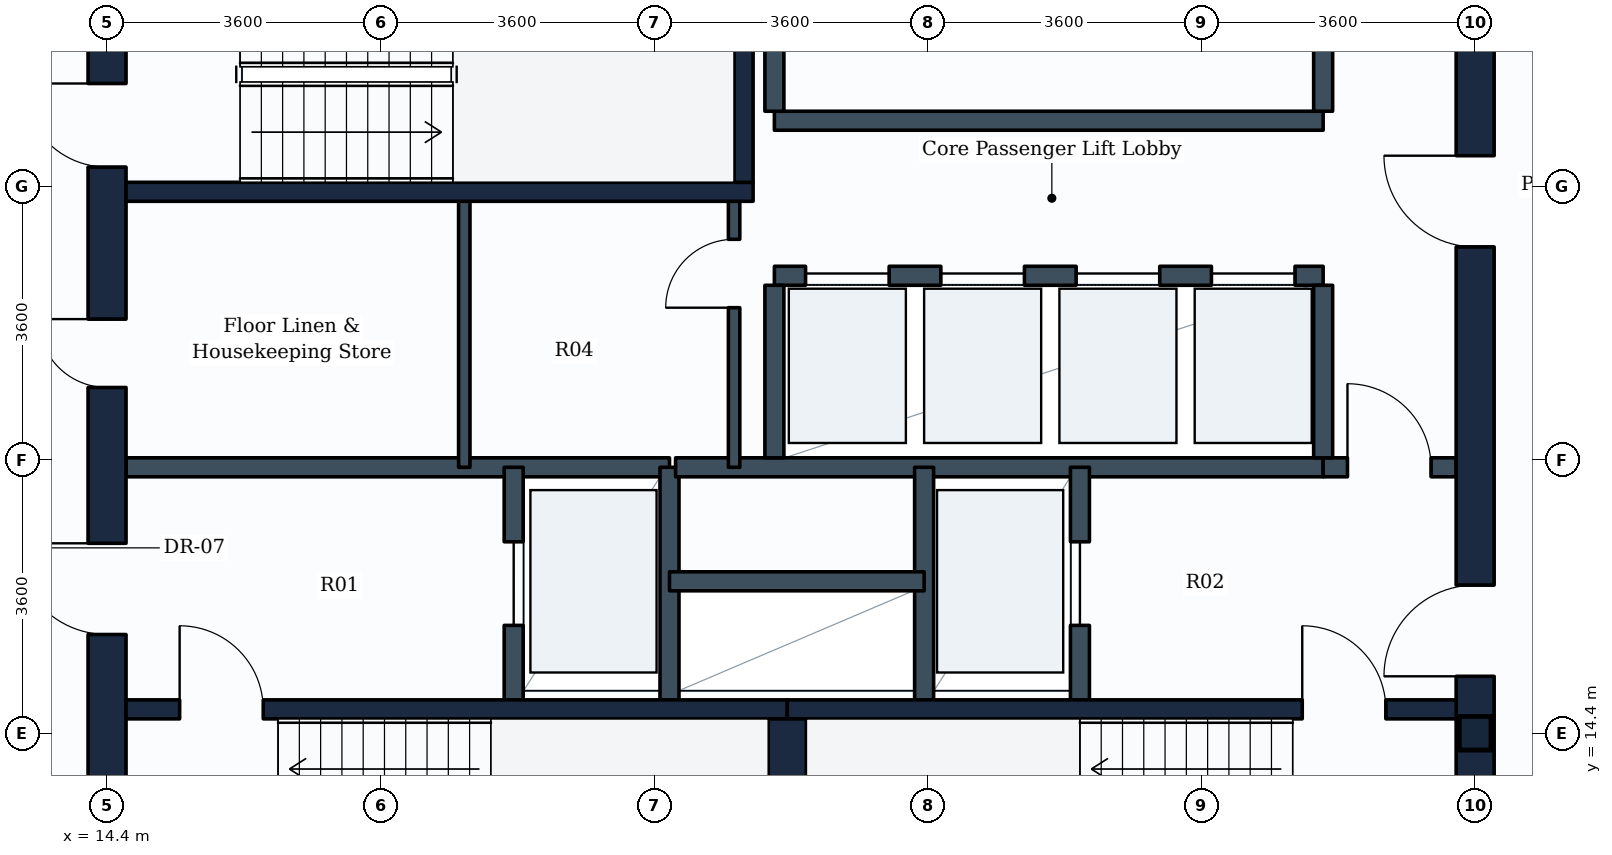
"""IFC4 building model, lengths in metres.
Left out: names, types, materials, properties, quantities, classifications, styles, units other than length and angle.
Written with IfcOpenShell. Run it as: python <this file> out.ifc"""

import sys

from ifc_helpers import new_model, si_unit, direction, frame, frame_2d, origin, origin_2d, place, context, subcontext, project, spatial, rectangle, i_section, extrude, element, fill, save


model = new_model("IFC4")
c1 = context("Model", 3, precision=1e-05, world=origin(), true_north=direction((0.0, 1.0)))
c2 = subcontext(c1, "Body", "Model", "MODEL_VIEW")
j1 = project(units=[si_unit("LENGTHUNIT", "METRE"), si_unit("PLANEANGLEUNIT", "RADIAN")], contexts=[c1])
p1 = place(None, origin())
s1 = spatial("IfcSite", under=j1, at=p1, CompositionType="ELEMENT")
p2 = place(p1, origin())
s2 = spatial("IfcBuilding", under=s1, at=p2, CompositionType="ELEMENT")
p3 = place(p2, frame((0.0, 0.0, 174.8)))
s3 = spatial("IfcBuildingStorey", under=s2, at=p3, CompositionType="ELEMENT", Elevation=174.8)
p4 = place(p3, frame((32.4, 14.4, 0.0), z_axis=(0.0, 0.0, 1.0), x_axis=(1.0, 0.0, 0.0)))
e1 = element("IfcColumn", 1, at=p4, inside=s3, PredefinedType="COLUMN", context=c2, shape_type="SweptSolid", body=[
    extrude(i_section(OverallWidth=0.416, OverallDepth=0.442, WebThickness=0.025, FlangeThickness=0.041, FilletRadius=0.015, at=origin_2d()), origin(), (0.0, 0.0, 1.0), 3.8),
])
p5 = place(p3, frame((14.4, 10.8, 0.0), z_axis=(0.0, 0.0, 1.0), x_axis=(0.0, 1.0, 0.0)))
e2 = element("IfcWall", 2, at=p5, inside=s3, PredefinedType="SHEAR", context=c2, shape_type="SweptSolid", body=[
    extrude(rectangle(XDim=14.4, YDim=0.5, at=frame_2d((7.2, 0.0))), origin(), (0.0, 0.0, 1.0), 3.55),
])
p6 = place(p5, frame((11.05, 0.0, 0.0)))
e3 = element("IfcOpeningElement", 3, at=p6, cuts=e2, PredefinedType="OPENING", context=c2, shape_type="SweptSolid", body=[
    extrude(rectangle(XDim=1.1, YDim=2.1, at=frame_2d((0.55, 1.05))), frame((0.0, 0.26, 0.0), z_axis=(0.0, -1.0, 0.0), x_axis=(1.0, 0.0, 0.0)), (0.0, 0.0, 1.0), 0.52),
])
p7 = place(p5, frame((4.9, 0.0, 0.0)))
e4 = element("IfcOpeningElement", 4, at=p7, cuts=e2, PredefinedType="OPENING", context=c2, shape_type="SweptSolid", body=[
    extrude(rectangle(XDim=1.2, YDim=2.1, at=frame_2d((0.6, 1.05))), frame((0.0, 0.26, 0.0), z_axis=(0.0, -1.0, 0.0), x_axis=(1.0, 0.0, 0.0)), (0.0, 0.0, 1.0), 0.52),
])
p8 = place(p5, frame((8.15, 0.0, 0.0)))
e5 = element("IfcOpeningElement", 5, at=p8, cuts=e2, PredefinedType="OPENING", context=c2, shape_type="SweptSolid", body=[
    extrude(rectangle(XDim=0.9, YDim=2.1, at=frame_2d((0.45, 1.05))), frame((0.0, 0.26, 0.0), z_axis=(0.0, -1.0, 0.0), x_axis=(1.0, 0.0, 0.0)), (0.0, 0.0, 1.0), 0.52),
])
p9 = place(p3, frame((32.4, 10.8, 0.0), z_axis=(0.0, 0.0, 1.0), x_axis=(0.0, 1.0, 0.0)))
e6 = element("IfcWall", 6, at=p9, inside=s3, PredefinedType="SHEAR", context=c2, shape_type="SweptSolid", body=[
    extrude(rectangle(XDim=14.4, YDim=0.5, at=frame_2d((7.2, 0.0))), origin(), (0.0, 0.0, 1.0), 3.55),
])
p10 = place(p9, frame((4.35, 0.0, 0.0)))
e7 = element("IfcOpeningElement", 7, at=p10, cuts=e6, PredefinedType="OPENING", context=c2, shape_type="SweptSolid", body=[
    extrude(rectangle(XDim=1.2, YDim=2.1, at=frame_2d((0.6, 1.05))), frame((0.0, 0.26, 0.0), z_axis=(0.0, -1.0, 0.0), x_axis=(1.0, 0.0, 0.0)), (0.0, 0.0, 1.0), 0.52),
])
p11 = place(p9, frame((10.0, 0.0, 0.0)))
e8 = element("IfcOpeningElement", 8, at=p11, cuts=e6, PredefinedType="OPENING", context=c2, shape_type="SweptSolid", body=[
    extrude(rectangle(XDim=1.2, YDim=2.1, at=frame_2d((0.6, 1.05))), frame((0.0, 0.26, 0.0), z_axis=(0.0, -1.0, 0.0), x_axis=(1.0, 0.0, 0.0)), (0.0, 0.0, 1.0), 0.52),
])
p12 = place(p3, frame((14.65, 14.715, 0.0), z_axis=(0.0, 0.0, 1.0), x_axis=(1.0, 0.0, 0.0)))
e9 = element("IfcWall", 9, at=p12, inside=s3, PredefinedType="SHEAR", context=c2, shape_type="SweptSolid", body=[
    extrude(rectangle(XDim=8.7, YDim=0.25, at=frame_2d((4.35, 0.0))), origin(), (0.0, 0.0, 1.0), 3.55),
])
p13 = place(p12, frame((0.705, 0.0, 0.0)))
e10 = element("IfcOpeningElement", 10, at=p13, cuts=e9, PredefinedType="OPENING", context=c2, shape_type="SweptSolid", body=[
    extrude(rectangle(XDim=1.1, YDim=2.1, at=frame_2d((0.55, 1.05))), frame((0.0, 0.135, 0.0), z_axis=(0.0, -1.0, 0.0), x_axis=(1.0, 0.0, 0.0)), (0.0, 0.0, 1.0), 0.27),
])
p14 = place(p3, frame((23.35, 14.715, 0.0), z_axis=(0.0, 0.0, 1.0), x_axis=(1.0, 0.0, 0.0)))
e11 = element("IfcWall", 11, at=p14, inside=s3, PredefinedType="SHEAR", context=c2, shape_type="SweptSolid", body=[
    extrude(rectangle(XDim=8.8, YDim=0.25, at=frame_2d((4.4, 0.0))), origin(), (0.0, 0.0, 1.0), 3.55),
])
p15 = place(p14, frame((6.775, 0.0, 0.0)))
e12 = element("IfcOpeningElement", 12, at=p15, cuts=e11, PredefinedType="OPENING", context=c2, shape_type="SweptSolid", body=[
    extrude(rectangle(XDim=1.1, YDim=2.1, at=frame_2d((0.55, 1.05))), frame((0.0, 0.135, 0.0), z_axis=(0.0, -1.0, 0.0), x_axis=(1.0, 0.0, 0.0)), (0.0, 0.0, 1.0), 0.27),
])
p16 = place(p3, frame((23.35, 11.75, 0.0), z_axis=(0.0, 0.0, 1.0), x_axis=(0.0, 1.0, 0.0)))
e13 = element("IfcWall", 13, at=p16, inside=s3, PredefinedType="SHEAR", context=c2, shape_type="SweptSolid", body=[
    extrude(rectangle(XDim=2.84, YDim=0.5, at=frame_2d((1.42, 0.0))), origin(), (0.0, 0.0, 1.0), 3.55),
])
p17 = place(p3, frame((14.65, 21.525, 0.0), z_axis=(0.0, 0.0, 1.0), x_axis=(1.0, 0.0, 0.0)))
e14 = element("IfcWall", 14, at=p17, inside=s3, PredefinedType="SHEAR", context=c2, shape_type="SweptSolid", body=[
    extrude(rectangle(XDim=8.25, YDim=0.25, at=frame_2d((4.125, 0.0))), origin(), (0.0, 0.0, 1.0), 3.55),
])
p18 = place(p3, frame((22.775, 21.65, 0.0), z_axis=(0.0, 0.0, 1.0), x_axis=(0.0, 1.0, 0.0)))
e15 = element("IfcWall", 15, at=p18, inside=s3, PredefinedType="SHEAR", context=c2, shape_type="SweptSolid", body=[
    extrude(rectangle(XDim=2.84, YDim=0.25, at=frame_2d((1.42, 0.0))), origin(), (0.0, 0.0, 1.0), 3.55),
])
p19 = place(p3, frame((14.65, 17.9, 0.0), z_axis=(0.0, 0.0, 1.0), x_axis=(1.0, 0.0, 0.0)))
e16 = element("IfcWall", 16, at=p19, inside=s3, PredefinedType="PARTITIONING", context=c2, shape_type="SweptSolid", body=[
    extrude(rectangle(XDim=7.15, YDim=0.25, at=frame_2d((3.575, 0.0))), origin(), (0.0, 0.0, 1.0), 3.535),
])
p20 = place(p3, frame((19.75, 14.84, 0.0), z_axis=(0.0, 0.0, 1.0), x_axis=(0.0, 1.0, 0.0)))
e17 = element("IfcWall", 17, at=p20, inside=s3, PredefinedType="PARTITIONING", context=c2, shape_type="SweptSolid", body=[
    extrude(rectangle(XDim=3.06, YDim=0.25, at=frame_2d((1.53, 0.0))), origin(), (0.0, 0.0, 1.0), 3.535),
])
p21 = place(p20, frame((0.98, 0.0, 0.0)))
e18 = element("IfcOpeningElement", 18, at=p21, cuts=e17, PredefinedType="OPENING", context=c2, shape_type="SweptSolid", body=[
    extrude(rectangle(XDim=1.1, YDim=2.1, at=frame_2d((0.55, 1.05))), frame((0.0, 0.135, 0.0), z_axis=(0.0, -1.0, 0.0), x_axis=(1.0, 0.0, 0.0)), (0.0, 0.0, 1.0), 0.27),
])
p22 = place(p3, frame((21.8, 14.84, 0.0), z_axis=(0.0, 0.0, 1.0), x_axis=(0.0, 1.0, 0.0)))
e19 = element("IfcWall", 19, at=p22, inside=s3, PredefinedType="PARTITIONING", context=c2, shape_type="SweptSolid", body=[
    extrude(rectangle(XDim=3.06, YDim=0.25, at=frame_2d((1.53, 0.0))), origin(), (0.0, 0.0, 1.0), 3.535),
])
p23 = place(p3, frame((21.88, 17.9, 0.0), z_axis=(0.0, 0.0, 1.0), x_axis=(1.0, 0.0, 0.0)))
e20 = element("IfcWall", 20, at=p23, inside=s3, PredefinedType="PARTITIONING", context=c2, shape_type="SweptSolid", body=[
    extrude(rectangle(XDim=8.52, YDim=0.25, at=frame_2d((4.26, 0.0))), origin(), (0.0, 0.0, 1.0), 3.535),
])
p24 = place(p3, frame((30.4, 17.9, 0.0), z_axis=(0.0, 0.0, 1.0), x_axis=(1.0, 0.0, 0.0)))
e21 = element("IfcWall", 21, at=p24, inside=s3, PredefinedType="PARTITIONING", context=c2, shape_type="SweptSolid", body=[
    extrude(rectangle(XDim=1.75, YDim=0.25, at=frame_2d((0.875, 0.0))), origin(), (0.0, 0.0, 1.0), 3.535),
])
p25 = place(p24, frame((0.32, 0.0, 0.0)))
e22 = element("IfcOpeningElement", 22, at=p25, cuts=e21, PredefinedType="OPENING", context=c2, shape_type="SweptSolid", body=[
    extrude(rectangle(XDim=1.1, YDim=2.1, at=frame_2d((0.55, 1.05))), frame((0.0, 0.135, 0.0), z_axis=(0.0, -1.0, 0.0), x_axis=(1.0, 0.0, 0.0)), (0.0, 0.0, 1.0), 0.27),
])
p26 = place(p3, frame((25.15, 14.84, 0.0), z_axis=(0.0, 0.0, 1.0), x_axis=(0.0, 1.0, 0.0)))
e23 = element("IfcWall", 23, at=p26, inside=s3, PredefinedType="PARTITIONING", context=c2, shape_type="SweptSolid", body=[
    extrude(rectangle(XDim=3.06, YDim=0.25, at=frame_2d((1.53, 0.0))), origin(), (0.0, 0.0, 1.0), 3.535),
])
p27 = place(p3, frame((27.2, 14.84, 0.0), z_axis=(0.0, 0.0, 1.0), x_axis=(0.0, 1.0, 0.0)))
e24 = element("IfcWall", 24, at=p27, inside=s3, PredefinedType="PARTITIONING", context=c2, shape_type="SweptSolid", body=[
    extrude(rectangle(XDim=3.06, YDim=0.25, at=frame_2d((1.53, 0.0))), origin(), (0.0, 0.0, 1.0), 3.535),
])
p28 = place(p27, frame((0.98, 0.0, 0.0)))
e25 = element("IfcOpeningElement", 25, at=p28, cuts=e24, PredefinedType="OPENING", context=c2, shape_type="SweptSolid", body=[
    extrude(rectangle(XDim=1.1, YDim=2.1, at=frame_2d((0.55, 1.05))), frame((0.0, 0.135, 0.0), z_axis=(0.0, -1.0, 0.0), x_axis=(1.0, 0.0, 0.0)), (0.0, 0.0, 1.0), 0.27),
])
p29 = place(p3, frame((21.8, 16.4, 0.0), z_axis=(0.0, 0.0, 1.0), x_axis=(1.0, 0.0, 0.0)))
e26 = element("IfcWall", 26, at=p29, inside=s3, PredefinedType="PARTITIONING", context=c2, shape_type="SweptSolid", body=[
    extrude(rectangle(XDim=3.35, YDim=0.25, at=frame_2d((1.675, 0.0))), origin(), (0.0, 0.0, 1.0), 3.535),
])
p30 = place(p3, frame((23.18, 20.42, 0.0), z_axis=(0.0, 0.0, 1.0), x_axis=(1.0, 0.0, 0.0)))
e27 = element("IfcWall", 27, at=p30, inside=s3, PredefinedType="PARTITIONING", context=c2, shape_type="SweptSolid", body=[
    extrude(rectangle(XDim=7.22, YDim=0.25, at=frame_2d((3.61, 0.0))), origin(), (0.0, 0.0, 1.0), 3.535),
])
p31 = place(p30, frame((0.41, 0.0, 0.0)))
e28 = element("IfcOpeningElement", 28, at=p31, cuts=e27, PredefinedType="OPENING", context=c2, shape_type="SweptSolid", body=[
    extrude(rectangle(XDim=1.1, YDim=2.1, at=frame_2d((0.55, 1.05))), frame((0.0, 0.135, 0.0), z_axis=(0.0, -1.0, 0.0), x_axis=(1.0, 0.0, 0.0)), (0.0, 0.0, 1.0), 0.27),
])
p32 = place(p30, frame((2.19, 0.0, 0.0)))
e29 = element("IfcOpeningElement", 29, at=p32, cuts=e27, PredefinedType="OPENING", context=c2, shape_type="SweptSolid", body=[
    extrude(rectangle(XDim=1.1, YDim=2.1, at=frame_2d((0.55, 1.05))), frame((0.0, 0.135, 0.0), z_axis=(0.0, -1.0, 0.0), x_axis=(1.0, 0.0, 0.0)), (0.0, 0.0, 1.0), 0.27),
])
p33 = place(p30, frame((3.97, 0.0, 0.0)))
e30 = element("IfcOpeningElement", 30, at=p33, cuts=e27, PredefinedType="OPENING", context=c2, shape_type="SweptSolid", body=[
    extrude(rectangle(XDim=1.1, YDim=2.1, at=frame_2d((0.55, 1.05))), frame((0.0, 0.135, 0.0), z_axis=(0.0, -1.0, 0.0), x_axis=(1.0, 0.0, 0.0)), (0.0, 0.0, 1.0), 0.27),
])
p34 = place(p30, frame((5.75, 0.0, 0.0)))
e31 = element("IfcOpeningElement", 31, at=p34, cuts=e27, PredefinedType="OPENING", context=c2, shape_type="SweptSolid", body=[
    extrude(rectangle(XDim=1.1, YDim=2.1, at=frame_2d((0.55, 1.05))), frame((0.0, 0.135, 0.0), z_axis=(0.0, -1.0, 0.0), x_axis=(1.0, 0.0, 0.0)), (0.0, 0.0, 1.0), 0.27),
])
for number, where, z_axis, x_axis in (
    (32, (23.18, 18.025, 0.0), (0.0, 0.0, 1.0), (0.0, 1.0, 0.0)),
    (33, (30.4, 18.025, 0.0), (0.0, 0.0, 1.0), (0.0, 1.0, 0.0)),
):
    element("IfcWall", number, at=place(p3, frame(where, z_axis=z_axis, x_axis=x_axis)), inside=s3, PredefinedType="PARTITIONING", context=c2, shape_type="SweptSolid", body=[
        extrude(rectangle(XDim=2.27, YDim=0.25, at=frame_2d((1.135, 0.0))), origin(), (0.0, 0.0, 1.0), 3.535),
    ])
p35 = place(p3, frame((23.18, 22.46, 0.0), z_axis=(0.0, 0.0, 1.0), x_axis=(1.0, 0.0, 0.0)))
e34 = element("IfcWall", 34, at=p35, inside=s3, PredefinedType="PARTITIONING", context=c2, shape_type="SweptSolid", body=[
    extrude(rectangle(XDim=7.22, YDim=0.25, at=frame_2d((3.61, 0.0))), origin(), (0.0, 0.0, 1.0), 3.535),
])
for number, where, z_axis, x_axis in (
    (35, (23.18, 22.585, 0.0), (0.0, 0.0, 1.0), (0.0, 1.0, 0.0)),
    (36, (30.4, 22.585, 0.0), (0.0, 0.0, 1.0), (0.0, 1.0, 0.0)),
):
    element("IfcWall", number, at=place(p3, frame(where, z_axis=z_axis, x_axis=x_axis)), inside=s3, PredefinedType="PARTITIONING", context=c2, shape_type="SweptSolid", body=[
        extrude(rectangle(XDim=2.315, YDim=0.25, at=frame_2d((1.157, 0.0))), origin(), (0.0, 0.0, 1.0), 3.535),
    ])
p36 = place(p3, frame((22.65, 17.9, 0.0), z_axis=(0.0, 0.0, 1.0), x_axis=(0.0, 1.0, 0.0)))
e37 = element("IfcWall", 37, at=p36, inside=s3, PredefinedType="PARTITIONING", context=c2, shape_type="SweptSolid", body=[
    extrude(rectangle(XDim=3.625, YDim=0.15, at=frame_2d((1.812, 0.0))), origin(), (0.0, 0.0, 1.0), 3.535),
])
p37 = place(p36, frame((2.1, 0.0, 0.0)))
e38 = element("IfcOpeningElement", 38, at=p37, cuts=e37, PredefinedType="OPENING", context=c2, shape_type="SweptSolid", body=[
    extrude(rectangle(XDim=0.9, YDim=2.1, at=frame_2d((0.45, 1.05))), frame((0.0, 0.085, 0.0), z_axis=(0.0, -1.0, 0.0), x_axis=(1.0, 0.0, 0.0)), (0.0, 0.0, 1.0), 0.17),
])
p38 = place(p3, frame((19.1, 17.9, 0.0), z_axis=(0.0, 0.0, 1.0), x_axis=(0.0, 1.0, 0.0)))
e39 = element("IfcWall", 39, at=p38, inside=s3, PredefinedType="PARTITIONING", context=c2, shape_type="SweptSolid", body=[
    extrude(rectangle(XDim=3.625, YDim=0.15, at=frame_2d((1.812, 0.0))), origin(), (0.0, 0.0, 1.0), 3.535),
])
p39 = place(p13, origin())
e40 = element("IfcDoor", 40, at=p39, inside=s3, OperationType="SINGLE_SWING_LEFT", PredefinedType="DOOR", context=c2, shape_type="SweptSolid", body=[
    extrude(rectangle(XDim=1.1, YDim=2.1, at=frame_2d((0.55, 1.05))), frame((0.0, 0.025, 0.0), z_axis=(0.0, -1.0, 0.0), x_axis=(1.0, 0.0, 0.0)), (0.0, 0.0, 1.0), 0.05),
])
fill(e10, e40)
p40 = place(p15, origin())
e41 = element("IfcDoor", 41, at=p40, inside=s3, OperationType="SINGLE_SWING_LEFT", PredefinedType="DOOR", context=c2, shape_type="SweptSolid", body=[
    extrude(rectangle(XDim=1.1, YDim=2.1, at=frame_2d((0.55, 1.05))), frame((0.0, 0.025, 0.0), z_axis=(0.0, -1.0, 0.0), x_axis=(1.0, 0.0, 0.0)), (0.0, 0.0, 1.0), 0.05),
])
fill(e12, e41)
p41 = place(p6, origin())
e42 = element("IfcDoor", 42, at=p41, inside=s3, OperationType="SINGLE_SWING_RIGHT", PredefinedType="DOOR", context=c2, shape_type="SweptSolid", body=[
    extrude(rectangle(XDim=1.1, YDim=2.1, at=frame_2d((0.55, 1.05))), frame((0.0, 0.025, 0.0), z_axis=(0.0, -1.0, 0.0), x_axis=(1.0, 0.0, 0.0)), (0.0, 0.0, 1.0), 0.05),
])
fill(e3, e42)
p42 = place(p21, origin())
e43 = element("IfcDoor", 43, at=p42, inside=s3, OperationType="SLIDING_TO_LEFT", PredefinedType="DOOR", context=c2, shape_type="SweptSolid", body=[
    extrude(rectangle(XDim=1.1, YDim=2.1, at=frame_2d((0.55, 1.05))), frame((0.0, 0.025, 0.0), z_axis=(0.0, -1.0, 0.0), x_axis=(1.0, 0.0, 0.0)), (0.0, 0.0, 1.0), 0.05),
])
fill(e18, e43)
p43 = place(p28, origin())
e44 = element("IfcDoor", 44, at=p43, inside=s3, OperationType="SLIDING_TO_LEFT", PredefinedType="DOOR", context=c2, shape_type="SweptSolid", body=[
    extrude(rectangle(XDim=1.1, YDim=2.1, at=frame_2d((0.55, 1.05))), frame((0.0, 0.025, 0.0), z_axis=(0.0, -1.0, 0.0), x_axis=(1.0, 0.0, 0.0)), (0.0, 0.0, 1.0), 0.05),
])
fill(e25, e44)
p44 = place(p7, origin())
e45 = element("IfcDoor", 45, at=p44, inside=s3, OperationType="SINGLE_SWING_RIGHT", PredefinedType="DOOR", context=c2, shape_type="SweptSolid", body=[
    extrude(rectangle(XDim=1.2, YDim=2.1, at=frame_2d((0.6, 1.05))), frame((0.0, 0.025, 0.0), z_axis=(0.0, -1.0, 0.0), x_axis=(1.0, 0.0, 0.0)), (0.0, 0.0, 1.0), 0.05),
])
fill(e4, e45)
p45 = place(p10, origin())
e46 = element("IfcDoor", 46, at=p45, inside=s3, OperationType="SINGLE_SWING_LEFT", PredefinedType="DOOR", context=c2, shape_type="SweptSolid", body=[
    extrude(rectangle(XDim=1.2, YDim=2.1, at=frame_2d((0.6, 1.05))), frame((0.0, 0.025, 0.0), z_axis=(0.0, -1.0, 0.0), x_axis=(1.0, 0.0, 0.0)), (0.0, 0.0, 1.0), 0.05),
])
fill(e7, e46)
p46 = place(p25, origin())
e47 = element("IfcDoor", 47, at=p46, inside=s3, OperationType="SINGLE_SWING_LEFT", PredefinedType="DOOR", context=c2, shape_type="SweptSolid", body=[
    extrude(rectangle(XDim=1.1, YDim=2.1, at=frame_2d((0.55, 1.05))), frame((0.0, 0.025, 0.0), z_axis=(0.0, -1.0, 0.0), x_axis=(1.0, 0.0, 0.0)), (0.0, 0.0, 1.0), 0.05),
])
fill(e22, e47)
p47 = place(p31, origin())
e48 = element("IfcDoor", 48, at=p47, inside=s3, OperationType="SLIDING_TO_LEFT", PredefinedType="DOOR", context=c2, shape_type="SweptSolid", body=[
    extrude(rectangle(XDim=1.1, YDim=2.1, at=frame_2d((0.55, 1.05))), frame((0.0, 0.025, 0.0), z_axis=(0.0, -1.0, 0.0), x_axis=(1.0, 0.0, 0.0)), (0.0, 0.0, 1.0), 0.05),
])
fill(e28, e48)
p48 = place(p32, origin())
e49 = element("IfcDoor", 49, at=p48, inside=s3, OperationType="SLIDING_TO_LEFT", PredefinedType="DOOR", context=c2, shape_type="SweptSolid", body=[
    extrude(rectangle(XDim=1.1, YDim=2.1, at=frame_2d((0.55, 1.05))), frame((0.0, 0.025, 0.0), z_axis=(0.0, -1.0, 0.0), x_axis=(1.0, 0.0, 0.0)), (0.0, 0.0, 1.0), 0.05),
])
fill(e29, e49)
p49 = place(p33, origin())
e50 = element("IfcDoor", 50, at=p49, inside=s3, OperationType="SLIDING_TO_LEFT", PredefinedType="DOOR", context=c2, shape_type="SweptSolid", body=[
    extrude(rectangle(XDim=1.1, YDim=2.1, at=frame_2d((0.55, 1.05))), frame((0.0, 0.025, 0.0), z_axis=(0.0, -1.0, 0.0), x_axis=(1.0, 0.0, 0.0)), (0.0, 0.0, 1.0), 0.05),
])
fill(e30, e50)
p50 = place(p34, origin())
e51 = element("IfcDoor", 51, at=p50, inside=s3, OperationType="SLIDING_TO_LEFT", PredefinedType="DOOR", context=c2, shape_type="SweptSolid", body=[
    extrude(rectangle(XDim=1.1, YDim=2.1, at=frame_2d((0.55, 1.05))), frame((0.0, 0.025, 0.0), z_axis=(0.0, -1.0, 0.0), x_axis=(1.0, 0.0, 0.0)), (0.0, 0.0, 1.0), 0.05),
])
fill(e31, e51)
p51 = place(p11, origin())
e52 = element("IfcDoor", 52, at=p51, inside=s3, OperationType="SINGLE_SWING_RIGHT", PredefinedType="DOOR", context=c2, shape_type="SweptSolid", body=[
    extrude(rectangle(XDim=1.2, YDim=2.1, at=frame_2d((0.6, 1.05))), frame((0.0, 0.025, 0.0), z_axis=(0.0, -1.0, 0.0), x_axis=(1.0, 0.0, 0.0)), (0.0, 0.0, 1.0), 0.05),
])
fill(e8, e52)
p52 = place(p8, origin())
e53 = element("IfcDoor", 53, at=p52, inside=s3, OperationType="SINGLE_SWING_RIGHT", PredefinedType="DOOR", context=c2, shape_type="SweptSolid", body=[
    extrude(rectangle(XDim=0.9, YDim=2.1, at=frame_2d((0.45, 1.05))), frame((0.0, 0.025, 0.0), z_axis=(0.0, -1.0, 0.0), x_axis=(1.0, 0.0, 0.0)), (0.0, 0.0, 1.0), 0.05),
])
fill(e5, e53)
p53 = place(p37, origin())
e54 = element("IfcDoor", 54, at=p53, inside=s3, OperationType="SINGLE_SWING_LEFT", PredefinedType="DOOR", context=c2, shape_type="SweptSolid", body=[
    extrude(rectangle(XDim=0.9, YDim=2.1, at=frame_2d((0.45, 1.05))), frame((0.0, 0.025, 0.0), z_axis=(0.0, -1.0, 0.0), x_axis=(1.0, 0.0, 0.0)), (0.0, 0.0, 1.0), 0.05),
])
fill(e38, e54)
save(model, sys.argv[1])
